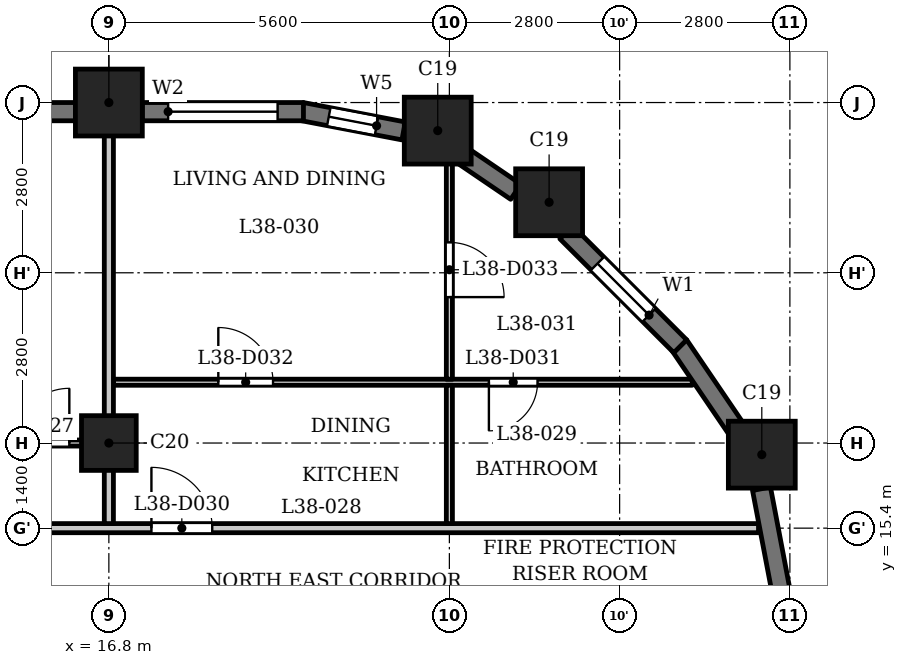
"""IFC4 building model, lengths in metres.
Left out: names, types, materials, properties, quantities, classifications, styles, units other than length and angle.
Written with IfcOpenShell. Run it as: python <this file> out.ifc"""

import sys

from ifc_helpers import new_model, si_unit, direction, frame, frame_2d, origin, origin_2d, place, context, subcontext, project, spatial, rectangle, extrude, element, fill, save


model = new_model("IFC4")
c1 = context("Model", 3, precision=1e-05, world=origin(), true_north=direction((0.0, 1.0)))
c2 = subcontext(c1, "Body", "Model", "MODEL_VIEW")
j1 = project(units=[si_unit("LENGTHUNIT", "METRE"), si_unit("PLANEANGLEUNIT", "RADIAN")], contexts=[c1])
p1 = place(None, origin())
s1 = spatial("IfcSite", under=j1, at=p1, CompositionType="ELEMENT")
p2 = place(p1, origin())
s2 = spatial("IfcBuilding", under=s1, at=p2, CompositionType="ELEMENT")
p3 = place(p2, frame((0.0, 0.0, 150.1)))
s3 = spatial("IfcBuildingStorey", under=s2, at=p3, CompositionType="ELEMENT", Elevation=150.1)
for number, where, z_axis, x_axis in (
    (1, (27.538, 16.609, 0.0), (0.0, 0.0, 1.0), (1.0, 0.0, 0.0)),
    (2, (24.04, 20.76, 0.0), (0.0, 0.0, 1.0), (1.0, 0.0, 0.0)),
    (3, (22.209, 21.938, 0.0), (0.0, 0.0, 1.0), (1.0, 0.0, 0.0)),
    (4, (16.8, 22.4, 0.0), (0.0, 0.0, 1.0), (1.0, 0.0, 0.0)),
):
    element("IfcColumn", number, at=place(p3, frame(where, z_axis=z_axis, x_axis=x_axis)), inside=s3, PredefinedType="COLUMN", context=c2, shape_type="SweptSolid", body=[
        extrude(rectangle(XDim=1.1, YDim=1.1, at=origin_2d()), origin(), (0.0, 0.0, 1.0), 3.5),
    ])
p4 = place(p3, frame((16.8, 16.8, 0.0), z_axis=(0.0, 0.0, 1.0), x_axis=(1.0, 0.0, 0.0)))
e5 = element("IfcColumn", 5, at=p4, inside=s3, PredefinedType="COLUMN", context=c2, shape_type="SweptSolid", body=[
    extrude(rectangle(XDim=0.9, YDim=0.9, at=origin_2d()), origin(), (0.0, 0.0, 1.0), 3.5),
])
p5 = place(p3, frame((27.853, 14.372, 0.0), z_axis=(0.0, 0.0, 1.0), x_axis=(-0.187302784601, 0.982302227871, 0.0)))
e6 = element("IfcWall", 6, at=p5, inside=s3, PredefinedType="SOLIDWALL", context=c2, shape_type="SweptSolid", body=[
    extrude(rectangle(XDim=1.706, YDim=0.3, at=frame_2d((0.853, 0.0))), origin(), (0.0, 0.0, 1.0), 2.45),
])
p6 = place(p3, frame((27.138, 17.002, 0.0), z_axis=(0.0, 0.0, 1.0), x_axis=(-0.562075160946, 0.827086158419, 0.0)))
e7 = element("IfcWall", 7, at=p6, inside=s3, PredefinedType="SOLIDWALL", context=c2, shape_type="SweptSolid", body=[
    extrude(rectangle(XDim=1.706, YDim=0.3, at=frame_2d((0.853, 0.0))), origin(), (0.0, 0.0, 1.0), 2.45),
])
p7 = place(p3, frame((26.197, 18.391, 0.0), z_axis=(0.0, 0.0, 1.0), x_axis=(-0.707060717099, 0.707152842274, 0.0)))
e8 = element("IfcWall", 8, at=p7, inside=s3, PredefinedType="SOLIDWALL", context=c2, shape_type="SweptSolid", body=[
    extrude(rectangle(XDim=2.65, YDim=0.3, at=frame_2d((1.325, 0.0))), origin(), (0.0, 0.0, 1.0), 2.45),
])
p8 = place(p7, frame((0.725, 0.0, 0.6)))
e9 = element("IfcOpeningElement", 9, at=p8, cuts=e8, PredefinedType="OPENING", context=c2, shape_type="SweptSolid", body=[
    extrude(rectangle(XDim=1.2, YDim=1.55, at=frame_2d((0.6, 0.775))), frame((0.0, 0.16, 0.0), z_axis=(0.0, -1.0, 0.0), x_axis=(1.0, 0.0, 0.0)), (0.0, 0.0, 1.0), 0.32),
])
p9 = place(p3, frame((23.492, 20.932, 0.0), z_axis=(0.0, 0.0, 1.0), x_axis=(-0.826993959827, 0.562210806023, 0.0)))
e10 = element("IfcWall", 10, at=p9, inside=s3, PredefinedType="SOLIDWALL", context=c2, shape_type="SweptSolid", body=[
    extrude(rectangle(XDim=1.077, YDim=0.3, at=frame_2d((0.539, 0.0))), origin(), (0.0, 0.0, 1.0), 3.2),
])
p10 = place(p3, frame((21.648, 21.933, 0.0), z_axis=(0.0, 0.0, 1.0), x_axis=(-0.982297206936, 0.187329114784, 0.0)))
e11 = element("IfcWall", 11, at=p10, inside=s3, PredefinedType="SOLIDWALL", context=c2, shape_type="SweptSolid", body=[
    extrude(rectangle(XDim=1.706, YDim=0.3, at=frame_2d((0.853, 0.0))), origin(), (0.0, 0.0, 1.0), 2.45),
])
p11 = place(p10, frame((0.453, 0.0, 0.6)))
e12 = element("IfcOpeningElement", 12, at=p11, cuts=e11, PredefinedType="OPENING", context=c2, shape_type="SweptSolid", body=[
    extrude(rectangle(XDim=0.8, YDim=1.55, at=frame_2d((0.4, 0.775))), frame((0.0, 0.16, 0.0), z_axis=(0.0, -1.0, 0.0), x_axis=(1.0, 0.0, 0.0)), (0.0, 0.0, 1.0), 0.32),
])
p12 = place(p3, frame((20.0, 22.25, 0.0), z_axis=(0.0, 0.0, 1.0), x_axis=(-1.0, 0.0, 0.0)))
e13 = element("IfcWall", 13, at=p12, inside=s3, PredefinedType="SOLIDWALL", context=c2, shape_type="SweptSolid", body=[
    extrude(rectangle(XDim=2.65, YDim=0.3, at=frame_2d((1.325, 0.0))), origin(), (0.0, 0.0, 1.0), 2.45),
])
p13 = place(p12, frame((0.425, 0.0, 0.9)))
e14 = element("IfcOpeningElement", 14, at=p13, cuts=e13, PredefinedType="OPENING", context=c2, shape_type="SweptSolid", body=[
    extrude(rectangle(XDim=1.8, YDim=1.25, at=frame_2d((0.9, 0.625))), frame((0.0, 0.16, 0.0), z_axis=(0.0, -1.0, 0.0), x_axis=(1.0, 0.0, 0.0)), (0.0, 0.0, 1.0), 0.32),
])
p14 = place(p3, frame((16.25, 22.25, 0.0), z_axis=(0.0, 0.0, 1.0), x_axis=(-1.0, 0.0, 0.0)))
e15 = element("IfcWall", 15, at=p14, inside=s3, PredefinedType="SOLIDWALL", context=c2, shape_type="SweptSolid", body=[
    extrude(rectangle(XDim=4.5, YDim=0.3, at=frame_2d((2.25, 0.0))), origin(), (0.0, 0.0, 1.0), 2.45),
])
p15 = place(p14, frame((0.45, 0.0, 1.2)))
e16 = element("IfcOpeningElement", 16, at=p15, cuts=e15, PredefinedType="OPENING", context=c2, shape_type="SweptSolid", body=[
    extrude(rectangle(XDim=3.6, YDim=0.95, at=frame_2d((1.8, 0.475))), frame((0.0, 0.16, 0.0), z_axis=(0.0, -1.0, 0.0), x_axis=(1.0, 0.0, 0.0)), (0.0, 0.0, 1.0), 0.32),
])
p16 = place(p3, frame((14.925, 15.4, 0.0), z_axis=(0.0, 0.0, 1.0), x_axis=(1.0, 0.0, 0.0)))
e17 = element("IfcWall", 17, at=p16, inside=s3, PredefinedType="PARTITIONING", context=c2, shape_type="SweptSolid", body=[
    extrude(rectangle(XDim=12.559, YDim=0.15, at=frame_2d((6.279, 0.0))), origin(), (0.0, 0.0, 1.0), 3.2),
])
p17 = place(p16, frame((2.575, 0.0, 0.0)))
e18 = element("IfcOpeningElement", 18, at=p17, cuts=e17, PredefinedType="OPENING", context=c2, shape_type="SweptSolid", body=[
    extrude(rectangle(XDim=1.0, YDim=2.1, at=frame_2d((0.5, 1.05))), frame((0.0, 0.085, 0.0), z_axis=(0.0, -1.0, 0.0), x_axis=(1.0, 0.0, 0.0)), (0.0, 0.0, 1.0), 0.17),
])
p18 = place(p3, frame((-16.725, 16.8, 0.0), z_axis=(0.0, 0.0, 1.0), x_axis=(1.0, 0.0, 0.0)))
e19 = element("IfcWall", 19, at=p18, inside=s3, PredefinedType="PARTITIONING", context=c2, shape_type="SweptSolid", body=[
    extrude(rectangle(XDim=33.45, YDim=0.1, at=frame_2d((16.725, 0.0))), origin(), (0.0, 0.0, 1.0), 3.2),
])
p19 = place(p18, frame((9.575, 0.0, 0.0)))
e20 = element("IfcOpeningElement", 20, at=p19, cuts=e19, PredefinedType="OPENING", context=c2, shape_type="SweptSolid", body=[
    extrude(rectangle(XDim=0.8, YDim=2.1, at=frame_2d((0.4, 1.05))), frame((0.0, 0.06, 0.0), z_axis=(0.0, -1.0, 0.0), x_axis=(1.0, 0.0, 0.0)), (0.0, 0.0, 1.0), 0.12),
])
p20 = place(p18, frame((6.125, 0.0, 0.0)))
e21 = element("IfcOpeningElement", 21, at=p20, cuts=e19, PredefinedType="OPENING", context=c2, shape_type="SweptSolid", body=[
    extrude(rectangle(XDim=0.9, YDim=2.1, at=frame_2d((0.45, 1.05))), frame((0.0, 0.06, 0.0), z_axis=(0.0, -1.0, 0.0), x_axis=(1.0, 0.0, 0.0)), (0.0, 0.0, 1.0), 0.12),
])
p21 = place(p18, frame((0.975, 0.0, 0.0)))
e22 = element("IfcOpeningElement", 22, at=p21, cuts=e19, PredefinedType="OPENING", context=c2, shape_type="SweptSolid", body=[
    extrude(rectangle(XDim=0.9, YDim=2.1, at=frame_2d((0.45, 1.05))), frame((0.0, 0.06, 0.0), z_axis=(0.0, -1.0, 0.0), x_axis=(1.0, 0.0, 0.0)), (0.0, 0.0, 1.0), 0.12),
])
p22 = place(p18, frame((3.225, 0.0, 0.0)))
e23 = element("IfcOpeningElement", 23, at=p22, cuts=e19, PredefinedType="OPENING", context=c2, shape_type="SweptSolid", body=[
    extrude(rectangle(XDim=0.9, YDim=2.1, at=frame_2d((0.45, 1.05))), frame((0.0, 0.06, 0.0), z_axis=(0.0, -1.0, 0.0), x_axis=(1.0, 0.0, 0.0)), (0.0, 0.0, 1.0), 0.12),
])
p23 = place(p18, frame((15.375, 0.0, 0.0)))
e24 = element("IfcOpeningElement", 24, at=p23, cuts=e19, PredefinedType="OPENING", context=c2, shape_type="SweptSolid", body=[
    extrude(rectangle(XDim=0.8, YDim=2.1, at=frame_2d((0.4, 1.05))), frame((0.0, 0.06, 0.0), z_axis=(0.0, -1.0, 0.0), x_axis=(1.0, 0.0, 0.0)), (0.0, 0.0, 1.0), 0.12),
])
p24 = place(p18, frame((13.175, 0.0, 0.0)))
e25 = element("IfcOpeningElement", 25, at=p24, cuts=e19, PredefinedType="OPENING", context=c2, shape_type="SweptSolid", body=[
    extrude(rectangle(XDim=0.9, YDim=2.1, at=frame_2d((0.45, 1.05))), frame((0.0, 0.06, 0.0), z_axis=(0.0, -1.0, 0.0), x_axis=(1.0, 0.0, 0.0)), (0.0, 0.0, 1.0), 0.12),
])
p25 = place(p18, frame((31.975, 0.0, 0.0)))
e26 = element("IfcOpeningElement", 26, at=p25, cuts=e19, PredefinedType="OPENING", context=c2, shape_type="SweptSolid", body=[
    extrude(rectangle(XDim=0.9, YDim=2.1, at=frame_2d((0.45, 1.05))), frame((0.0, 0.06, 0.0), z_axis=(0.0, -1.0, 0.0), x_axis=(1.0, 0.0, 0.0)), (0.0, 0.0, 1.0), 0.12),
])
p26 = place(p18, frame((22.875, 0.0, 0.0)))
e27 = element("IfcOpeningElement", 27, at=p26, cuts=e19, PredefinedType="OPENING", context=c2, shape_type="SweptSolid", body=[
    extrude(rectangle(XDim=0.9, YDim=2.1, at=frame_2d((0.45, 1.05))), frame((0.0, 0.06, 0.0), z_axis=(0.0, -1.0, 0.0), x_axis=(1.0, 0.0, 0.0)), (0.0, 0.0, 1.0), 0.12),
])
p27 = place(p3, frame((16.875, 17.8, 0.0), z_axis=(0.0, 0.0, 1.0), x_axis=(1.0, 0.0, 0.0)))
e28 = element("IfcWall", 28, at=p27, inside=s3, PredefinedType="PARTITIONING", context=c2, shape_type="SweptSolid", body=[
    extrude(rectangle(XDim=9.519, YDim=0.1, at=frame_2d((4.76, 0.0))), origin(), (0.0, 0.0, 1.0), 3.2),
])
p28 = place(p27, frame((6.175, 0.0, 0.0)))
e29 = element("IfcOpeningElement", 29, at=p28, cuts=e28, PredefinedType="OPENING", context=c2, shape_type="SweptSolid", body=[
    extrude(rectangle(XDim=0.8, YDim=2.1, at=frame_2d((0.4, 1.05))), frame((0.0, 0.06, 0.0), z_axis=(0.0, -1.0, 0.0), x_axis=(1.0, 0.0, 0.0)), (0.0, 0.0, 1.0), 0.12),
])
p29 = place(p27, frame((1.725, 0.0, 0.0)))
e30 = element("IfcOpeningElement", 30, at=p29, cuts=e28, PredefinedType="OPENING", context=c2, shape_type="SweptSolid", body=[
    extrude(rectangle(XDim=0.9, YDim=2.1, at=frame_2d((0.45, 1.05))), frame((0.0, 0.06, 0.0), z_axis=(0.0, -1.0, 0.0), x_axis=(1.0, 0.0, 0.0)), (0.0, 0.0, 1.0), 0.12),
])
p30 = place(p3, frame((16.8, 15.475, 0.0), z_axis=(0.0, 0.0, 1.0), x_axis=(0.0, 1.0, 0.0)))
e31 = element("IfcWall", 31, at=p30, inside=s3, PredefinedType="PARTITIONING", context=c2, shape_type="SweptSolid", body=[
    extrude(rectangle(XDim=7.455, YDim=0.15, at=frame_2d((3.728, 0.0))), origin(), (0.0, 0.0, 1.0), 3.2),
])
p31 = place(p3, frame((22.4, 15.475, 0.0), z_axis=(0.0, 0.0, 1.0), x_axis=(0.0, 1.0, 0.0)))
e32 = element("IfcWall", 32, at=p31, inside=s3, PredefinedType="PARTITIONING", context=c2, shape_type="SweptSolid", body=[
    extrude(rectangle(XDim=2.275, YDim=0.1, at=frame_2d((1.137, 0.0))), origin(), (0.0, 0.0, 1.0), 3.2),
])
p32 = place(p3, frame((22.4, 17.85, 0.0), z_axis=(0.0, 0.0, 1.0), x_axis=(0.0, 1.0, 0.0)))
e33 = element("IfcWall", 33, at=p32, inside=s3, PredefinedType="PARTITIONING", context=c2, shape_type="SweptSolid", body=[
    extrude(rectangle(XDim=3.87, YDim=0.1, at=frame_2d((1.935, 0.0))), origin(), (0.0, 0.0, 1.0), 3.2),
])
p33 = place(p32, frame((1.35, 0.0, 0.0)))
e34 = element("IfcOpeningElement", 34, at=p33, cuts=e33, PredefinedType="OPENING", context=c2, shape_type="SweptSolid", body=[
    extrude(rectangle(XDim=0.9, YDim=2.1, at=frame_2d((0.45, 1.05))), frame((0.0, 0.06, 0.0), z_axis=(0.0, -1.0, 0.0), x_axis=(1.0, 0.0, 0.0)), (0.0, 0.0, 1.0), 0.12),
])
p34 = place(p25, origin())
e35 = element("IfcDoor", 35, at=p34, inside=s3, OperationType="SINGLE_SWING_LEFT", PredefinedType="DOOR", context=c2, shape_type="SweptSolid", body=[
    extrude(rectangle(XDim=0.9, YDim=2.1, at=frame_2d((0.45, 1.05))), frame((0.0, 0.025, 0.0), z_axis=(0.0, -1.0, 0.0), x_axis=(1.0, 0.0, 0.0)), (0.0, 0.0, 1.0), 0.05),
])
fill(e26, e35)
p35 = place(p17, origin())
e36 = element("IfcDoor", 36, at=p35, inside=s3, OperationType="SINGLE_SWING_RIGHT", PredefinedType="DOOR", context=c2, shape_type="SweptSolid", body=[
    extrude(rectangle(XDim=1.0, YDim=2.1, at=frame_2d((0.5, 1.05))), frame((0.0, 0.025, 0.0), z_axis=(0.0, -1.0, 0.0), x_axis=(1.0, 0.0, 0.0)), (0.0, 0.0, 1.0), 0.05),
])
fill(e18, e36)
p36 = place(p28, origin())
e37 = element("IfcDoor", 37, at=p36, inside=s3, OperationType="SINGLE_SWING_LEFT", PredefinedType="DOOR", context=c2, shape_type="SweptSolid", body=[
    extrude(rectangle(XDim=0.8, YDim=2.1, at=frame_2d((0.4, 1.05))), frame((0.0, 0.025, 0.0), z_axis=(0.0, -1.0, 0.0), x_axis=(1.0, 0.0, 0.0)), (0.0, 0.0, 1.0), 0.05),
])
fill(e29, e37)
p37 = place(p29, origin())
e38 = element("IfcDoor", 38, at=p37, inside=s3, OperationType="SINGLE_SWING_RIGHT", PredefinedType="DOOR", context=c2, shape_type="SweptSolid", body=[
    extrude(rectangle(XDim=0.9, YDim=2.1, at=frame_2d((0.45, 1.05))), frame((0.0, 0.025, 0.0), z_axis=(0.0, -1.0, 0.0), x_axis=(1.0, 0.0, 0.0)), (0.0, 0.0, 1.0), 0.05),
])
fill(e30, e38)
p38 = place(p33, origin())
e39 = element("IfcDoor", 39, at=p38, inside=s3, OperationType="SINGLE_SWING_LEFT", PredefinedType="DOOR", context=c2, shape_type="SweptSolid", body=[
    extrude(rectangle(XDim=0.9, YDim=2.1, at=frame_2d((0.45, 1.05))), frame((0.0, 0.025, 0.0), z_axis=(0.0, -1.0, 0.0), x_axis=(1.0, 0.0, 0.0)), (0.0, 0.0, 1.0), 0.05),
])
fill(e34, e39)
p39 = place(p8, origin())
e40 = element("IfcWindow", 40, at=p39, inside=s3, PartitioningType="SINGLE_PANEL", PredefinedType="WINDOW", context=c2, shape_type="SweptSolid", body=[
    extrude(rectangle(XDim=1.2, YDim=1.55, at=frame_2d((0.6, 0.775))), frame((0.0, 0.03, 0.0), z_axis=(0.0, -1.0, 0.0), x_axis=(1.0, 0.0, 0.0)), (0.0, 0.0, 1.0), 0.06),
])
fill(e9, e40)
p40 = place(p11, origin())
e41 = element("IfcWindow", 41, at=p40, inside=s3, PartitioningType="SINGLE_PANEL", PredefinedType="WINDOW", context=c2, shape_type="SweptSolid", body=[
    extrude(rectangle(XDim=0.8, YDim=1.55, at=frame_2d((0.4, 0.775))), frame((0.0, 0.03, 0.0), z_axis=(0.0, -1.0, 0.0), x_axis=(1.0, 0.0, 0.0)), (0.0, 0.0, 1.0), 0.06),
])
fill(e12, e41)
p41 = place(p13, origin())
e42 = element("IfcWindow", 42, at=p41, inside=s3, PartitioningType="SINGLE_PANEL", PredefinedType="WINDOW", context=c2, shape_type="SweptSolid", body=[
    extrude(rectangle(XDim=1.8, YDim=1.25, at=frame_2d((0.9, 0.625))), frame((0.0, 0.03, 0.0), z_axis=(0.0, -1.0, 0.0), x_axis=(1.0, 0.0, 0.0)), (0.0, 0.0, 1.0), 0.06),
])
fill(e14, e42)
save(model, sys.argv[1])
